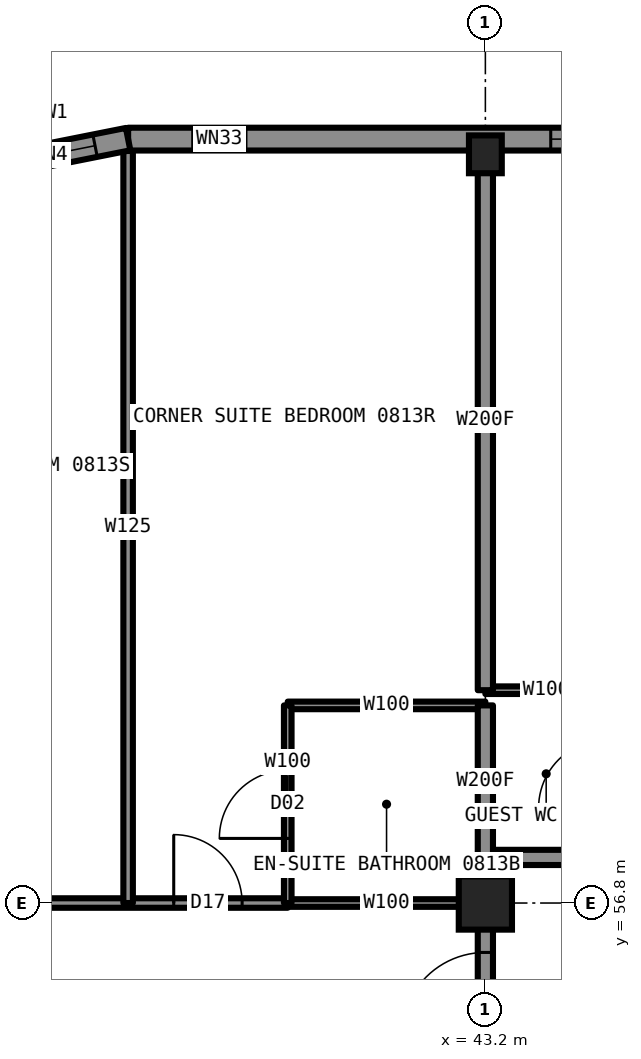
"""IFC4 building model, lengths in metres.
Left out: names, types, materials, properties, quantities, classifications, styles, units other than length and angle.
Written with IfcOpenShell. Run it as: python <this file> out.ifc"""

import sys

from ifc_helpers import new_model, si_unit, direction, frame, frame_2d, origin, origin_2d, place, context, subcontext, project, spatial, rectangle, hollow_rectangle, i_section, extrude, element, fill, save


model = new_model("IFC4")
c1 = context("Model", 3, precision=1e-05, world=origin(), true_north=direction((0.0, 1.0)))
c2 = subcontext(c1, "Body", "Model", "MODEL_VIEW")
j1 = project(units=[si_unit("LENGTHUNIT", "METRE"), si_unit("PLANEANGLEUNIT", "RADIAN")], contexts=[c1])
p1 = place(None, origin())
s1 = spatial("IfcSite", under=j1, at=p1, CompositionType="ELEMENT")
p2 = place(p1, origin())
s2 = spatial("IfcBuilding", under=s1, at=p2, CompositionType="ELEMENT")
p3 = place(p2, frame((0.0, 0.0, 28.5)))
s3 = spatial("IfcBuildingStorey", under=s2, at=p3, CompositionType="ELEMENT", Elevation=28.5)
p4 = place(p3, frame((43.2, 66.65, 0.0), z_axis=(0.0, 0.0, 1.0), x_axis=(1.0, 0.0, 0.0)))
e1 = element("IfcColumn", 1, at=p4, inside=s3, PredefinedType="COLUMN", context=c2, shape_type="SweptSolid", body=[
    extrude(i_section(OverallWidth=0.432, OverallDepth=0.498, WebThickness=0.056, FlangeThickness=0.089, at=origin_2d()), origin(), (0.0, 0.0, 1.0), 3.5),
])
p5 = place(p3, frame((43.2, 56.8, 0.0), z_axis=(0.0, 0.0, 1.0), x_axis=(1.0, 0.0, 0.0)))
e2 = element("IfcColumn", 2, at=p5, inside=s3, PredefinedType="COLUMN", context=c2, shape_type="SweptSolid", body=[
    extrude(hollow_rectangle(XDim=0.7, YDim=0.7, WallThickness=0.06, at=origin_2d()), origin(), (0.0, 0.0, 1.0), 3.5),
])
p6 = place(p3, frame((40.6, 56.8, 0.0), z_axis=(0.0, 0.0, 1.0), x_axis=(1.0, 0.0, 0.0)))
e3 = element("IfcWall", 3, at=p6, inside=s3, PredefinedType="PARTITIONING", context=c2, shape_type="SweptSolid", body=[
    extrude(rectangle(XDim=2.6, YDim=0.1, at=frame_2d((1.3, 0.0))), origin(), (0.0, 0.0, 1.0), 2.573),
])
p7 = place(p3, frame((33.3, 56.8, 0.0), z_axis=(0.0, 0.0, 1.0), x_axis=(1.0, 0.0, 0.0)))
e4 = element("IfcWall", 4, at=p7, inside=s3, PredefinedType="PARTITIONING", context=c2, shape_type="SweptSolid", body=[
    extrude(rectangle(XDim=7.3, YDim=0.125, at=frame_2d((3.65, 0.0))), origin(), (0.0, 0.0, 1.0), 2.573),
])
p8 = place(p7, frame((5.8, 0.0, 0.0)))
e5 = element("IfcOpeningElement", 5, at=p8, cuts=e4, PredefinedType="OPENING", context=c2, shape_type="SweptSolid", body=[
    extrude(rectangle(XDim=0.9, YDim=2.2, at=frame_2d((0.45, 1.1))), frame((0.0, 0.073, 0.0), z_axis=(0.0, -1.0, 0.0), x_axis=(1.0, 0.0, 0.0)), (0.0, 0.0, 1.0), 0.145),
])
p9 = place(p7, frame((2.0, 0.0, 0.0)))
e6 = element("IfcOpeningElement", 6, at=p9, cuts=e4, PredefinedType="OPENING", context=c2, shape_type="SweptSolid", body=[
    extrude(rectangle(XDim=0.9, YDim=2.2, at=frame_2d((0.45, 1.1))), frame((0.0, 0.073, 0.0), z_axis=(0.0, -1.0, 0.0), x_axis=(1.0, 0.0, 0.0)), (0.0, 0.0, 1.0), 0.145),
])
p10 = place(p3, frame((43.2, 57.4, 0.0), z_axis=(0.0, 0.0, 1.0), x_axis=(1.0, 0.0, 0.0)))
e7 = element("IfcWall", 7, at=p10, inside=s3, PredefinedType="PARTITIONING", context=c2, shape_type="SweptSolid", body=[
    extrude(rectangle(XDim=23.6, YDim=0.2, at=frame_2d((11.8, 0.0))), origin(), (0.0, 0.0, 1.0), 3.33),
])
p11 = place(p10, frame((1.85, 0.0, 0.0)))
e8 = element("IfcOpeningElement", 8, at=p11, cuts=e7, PredefinedType="OPENING", context=c2, shape_type="SweptSolid", body=[
    extrude(rectangle(XDim=1.1, YDim=2.2, at=frame_2d((0.55, 1.1))), frame((0.0, 0.11, 0.0), z_axis=(0.0, -1.0, 0.0), x_axis=(1.0, 0.0, 0.0)), (0.0, 0.0, 1.0), 0.22),
])
p12 = place(p10, frame((15.62, 0.0, 0.0)))
e9 = element("IfcOpeningElement", 9, at=p12, cuts=e7, PredefinedType="OPENING", context=c2, shape_type="SweptSolid", body=[
    extrude(rectangle(XDim=1.0, YDim=2.2, at=frame_2d((0.5, 1.1))), frame((0.0, 0.11, 0.0), z_axis=(0.0, -1.0, 0.0), x_axis=(1.0, 0.0, 0.0)), (0.0, 0.0, 1.0), 0.22),
])
p13 = place(p10, frame((20.34, 0.0, 0.0)))
e10 = element("IfcOpeningElement", 10, at=p13, cuts=e7, PredefinedType="OPENING", context=c2, shape_type="SweptSolid", body=[
    extrude(rectangle(XDim=1.0, YDim=2.2, at=frame_2d((0.5, 1.1))), frame((0.0, 0.11, 0.0), z_axis=(0.0, -1.0, 0.0), x_axis=(1.0, 0.0, 0.0)), (0.0, 0.0, 1.0), 0.22),
])
p14 = place(p3, frame((40.6, 59.4, 0.0), z_axis=(0.0, 0.0, 1.0), x_axis=(1.0, 0.0, 0.0)))
e11 = element("IfcWall", 11, at=p14, inside=s3, PredefinedType="PARTITIONING", context=c2, shape_type="SweptSolid", body=[
    extrude(rectangle(XDim=2.6, YDim=0.1, at=frame_2d((1.3, 0.0))), origin(), (0.0, 0.0, 1.0), 3.33),
])
p15 = place(p3, frame((43.2, 59.6, 0.0), z_axis=(0.0, 0.0, 1.0), x_axis=(1.0, 0.0, 0.0)))
e12 = element("IfcWall", 12, at=p15, inside=s3, PredefinedType="PARTITIONING", context=c2, shape_type="SweptSolid", body=[
    extrude(rectangle(XDim=1.6, YDim=0.1, at=frame_2d((0.8, 0.0))), origin(), (0.0, 0.0, 1.0), 3.33),
])
p16 = place(p3, frame((43.2, 33.22, 0.0), z_axis=(0.0, 0.0, 1.0), x_axis=(0.0, 1.0, 0.0)))
e13 = element("IfcWall", 13, at=p16, inside=s3, PredefinedType="PARTITIONING", context=c2, shape_type="SweptSolid", body=[
    extrude(rectangle(XDim=23.56, YDim=0.2, at=frame_2d((11.78, 0.0))), origin(), (0.0, 0.0, 1.0), 3.33),
])
p17 = place(p16, frame((6.16, 0.0, 0.0)))
e14 = element("IfcOpeningElement", 14, at=p17, cuts=e13, PredefinedType="OPENING", context=c2, shape_type="SweptSolid", body=[
    extrude(rectangle(XDim=1.0, YDim=2.2, at=frame_2d((0.5, 1.1))), frame((0.0, 0.11, 0.0), z_axis=(0.0, -1.0, 0.0), x_axis=(1.0, 0.0, 0.0)), (0.0, 0.0, 1.0), 0.22),
])
p18 = place(p16, frame((11.68, 0.0, 0.0)))
e15 = element("IfcOpeningElement", 15, at=p18, cuts=e13, PredefinedType="OPENING", context=c2, shape_type="SweptSolid", body=[
    extrude(rectangle(XDim=1.0, YDim=2.2, at=frame_2d((0.5, 1.1))), frame((0.0, 0.11, 0.0), z_axis=(0.0, -1.0, 0.0), x_axis=(1.0, 0.0, 0.0)), (0.0, 0.0, 1.0), 0.22),
])
p19 = place(p16, frame((14.54, 0.0, 0.0)))
e16 = element("IfcOpeningElement", 16, at=p19, cuts=e13, PredefinedType="OPENING", context=c2, shape_type="SweptSolid", body=[
    extrude(rectangle(XDim=1.0, YDim=2.2, at=frame_2d((0.5, 1.1))), frame((0.0, 0.11, 0.0), z_axis=(0.0, -1.0, 0.0), x_axis=(1.0, 0.0, 0.0)), (0.0, 0.0, 1.0), 0.22),
])
p20 = place(p16, frame((21.83, 0.0, 0.0)))
e17 = element("IfcOpeningElement", 17, at=p20, cuts=e13, PredefinedType="OPENING", context=c2, shape_type="SweptSolid", body=[
    extrude(rectangle(XDim=1.1, YDim=2.2, at=frame_2d((0.55, 1.1))), frame((0.0, 0.11, 0.0), z_axis=(0.0, -1.0, 0.0), x_axis=(1.0, 0.0, 0.0)), (0.0, 0.0, 1.0), 0.22),
])
p21 = place(p16, frame((0.63, 0.0, 0.0)))
e18 = element("IfcOpeningElement", 18, at=p21, cuts=e13, PredefinedType="OPENING", context=c2, shape_type="SweptSolid", body=[
    extrude(rectangle(XDim=1.1, YDim=2.2, at=frame_2d((0.55, 1.1))), frame((0.0, 0.11, 0.0), z_axis=(0.0, -1.0, 0.0), x_axis=(1.0, 0.0, 0.0)), (0.0, 0.0, 1.0), 0.22),
])
p22 = place(p3, frame((43.2, 57.4, 0.0), z_axis=(0.0, 0.0, 1.0), x_axis=(0.0, 1.0, 0.0)))
e19 = element("IfcWall", 19, at=p22, inside=s3, PredefinedType="PARTITIONING", context=c2, shape_type="SweptSolid", body=[
    extrude(rectangle(XDim=2.0, YDim=0.2, at=frame_2d((1.0, 0.0))), origin(), (0.0, 0.0, 1.0), 2.573),
])
p23 = place(p3, frame((43.2, 59.6, 0.0), z_axis=(0.0, 0.0, 1.0), x_axis=(0.0, 1.0, 0.0)))
e20 = element("IfcWall", 20, at=p23, inside=s3, PredefinedType="PARTITIONING", context=c2, shape_type="SweptSolid", body=[
    extrude(rectangle(XDim=7.1, YDim=0.2, at=frame_2d((3.55, 0.0))), origin(), (0.0, 0.0, 1.0), 2.573),
])
p24 = place(p3, frame((40.6, 56.8, 0.0), z_axis=(0.0, 0.0, 1.0), x_axis=(0.0, 1.0, 0.0)))
e21 = element("IfcWall", 21, at=p24, inside=s3, PredefinedType="PARTITIONING", context=c2, shape_type="SweptSolid", body=[
    extrude(rectangle(XDim=2.6, YDim=0.1, at=frame_2d((1.3, 0.0))), origin(), (0.0, 0.0, 1.0), 3.33),
])
p25 = place(p24, frame((0.85, 0.0, 0.0)))
e22 = element("IfcOpeningElement", 22, at=p25, cuts=e21, PredefinedType="OPENING", context=c2, shape_type="SweptSolid", body=[
    extrude(rectangle(XDim=0.9, YDim=2.1, at=frame_2d((0.45, 1.05))), frame((0.0, 0.06, 0.0), z_axis=(0.0, -1.0, 0.0), x_axis=(1.0, 0.0, 0.0)), (0.0, 0.0, 1.0), 0.12),
])
p26 = place(p3, frame((38.5, 56.8, 0.0), z_axis=(0.0, 0.0, 1.0), x_axis=(0.0, 1.0, 0.0)))
e23 = element("IfcWall", 23, at=p26, inside=s3, PredefinedType="PARTITIONING", context=c2, shape_type="SweptSolid", body=[
    extrude(rectangle(XDim=9.894, YDim=0.125, at=frame_2d((4.947, 0.0))), origin(), (0.0, 0.0, 1.0), 3.33),
])
p27 = place(p3, frame((71.5, 66.85, 0.0), z_axis=(0.0, 0.0, 1.0), x_axis=(-1.0, 0.0, 0.0)))
e24 = element("IfcWall", 24, at=p27, inside=s3, PredefinedType="SOLIDWALL", context=c2, shape_type="SweptSolid", body=[
    extrude(rectangle(XDim=33.0, YDim=0.3, at=frame_2d((16.5, 0.0))), origin(), (0.0, 0.0, 1.0), 2.83),
])
p28 = place(p27, frame((0.85, 0.0, 0.5)))
e25 = element("IfcOpeningElement", 25, at=p28, cuts=e24, PredefinedType="OPENING", context=c2, shape_type="SweptSolid", body=[
    extrude(rectangle(XDim=3.0, YDim=2.0, at=frame_2d((1.5, 1.0))), frame((0.0, 0.16, 0.0), z_axis=(0.0, -1.0, 0.0), x_axis=(1.0, 0.0, 0.0)), (0.0, 0.0, 1.0), 0.32),
])
p29 = place(p27, frame((5.56, 0.0, 0.5)))
e26 = element("IfcOpeningElement", 26, at=p29, cuts=e24, PredefinedType="OPENING", context=c2, shape_type="SweptSolid", body=[
    extrude(rectangle(XDim=3.0, YDim=2.0, at=frame_2d((1.5, 1.0))), frame((0.0, 0.16, 0.0), z_axis=(0.0, -1.0, 0.0), x_axis=(1.0, 0.0, 0.0)), (0.0, 0.0, 1.0), 0.32),
])
p30 = place(p27, frame((10.28, 0.0, 0.5)))
e27 = element("IfcOpeningElement", 27, at=p30, cuts=e24, PredefinedType="OPENING", context=c2, shape_type="SweptSolid", body=[
    extrude(rectangle(XDim=3.0, YDim=2.0, at=frame_2d((1.5, 1.0))), frame((0.0, 0.16, 0.0), z_axis=(0.0, -1.0, 0.0), x_axis=(1.0, 0.0, 0.0)), (0.0, 0.0, 1.0), 0.32),
])
p31 = place(p27, frame((15.0, 0.0, 0.5)))
e28 = element("IfcOpeningElement", 28, at=p31, cuts=e24, PredefinedType="OPENING", context=c2, shape_type="SweptSolid", body=[
    extrude(rectangle(XDim=3.0, YDim=2.0, at=frame_2d((1.5, 1.0))), frame((0.0, 0.16, 0.0), z_axis=(0.0, -1.0, 0.0), x_axis=(1.0, 0.0, 0.0)), (0.0, 0.0, 1.0), 0.32),
])
p32 = place(p27, frame((19.72, 0.0, 0.5)))
e29 = element("IfcOpeningElement", 29, at=p32, cuts=e24, PredefinedType="OPENING", context=c2, shape_type="SweptSolid", body=[
    extrude(rectangle(XDim=3.0, YDim=2.0, at=frame_2d((1.5, 1.0))), frame((0.0, 0.16, 0.0), z_axis=(0.0, -1.0, 0.0), x_axis=(1.0, 0.0, 0.0)), (0.0, 0.0, 1.0), 0.32),
])
p33 = place(p27, frame((24.44, 0.0, 0.5)))
e30 = element("IfcOpeningElement", 30, at=p33, cuts=e24, PredefinedType="OPENING", context=c2, shape_type="SweptSolid", body=[
    extrude(rectangle(XDim=3.0, YDim=2.0, at=frame_2d((1.5, 1.0))), frame((0.0, 0.16, 0.0), z_axis=(0.0, -1.0, 0.0), x_axis=(1.0, 0.0, 0.0)), (0.0, 0.0, 1.0), 0.32),
])
p34 = place(p27, frame((29.15, 0.0, 0.5)))
e31 = element("IfcOpeningElement", 31, at=p34, cuts=e24, PredefinedType="OPENING", context=c2, shape_type="SweptSolid", body=[
    extrude(rectangle(XDim=3.0, YDim=2.0, at=frame_2d((1.5, 1.0))), frame((0.0, 0.16, 0.0), z_axis=(0.0, -1.0, 0.0), x_axis=(1.0, 0.0, 0.0)), (0.0, 0.0, 1.0), 0.32),
])
p35 = place(p3, frame((38.5, 66.85, 0.0), z_axis=(0.0, 0.0, 1.0), x_axis=(-0.980787050784, -0.195081421501, 0.0)))
e32 = element("IfcWall", 32, at=p35, inside=s3, PredefinedType="SOLIDWALL", context=c2, shape_type="SweptSolid", body=[
    extrude(rectangle(XDim=2.087, YDim=0.3, at=frame_2d((1.044, 0.0))), origin(), (0.0, 0.0, 1.0), 3.33),
])
p36 = place(p35, frame((0.444, 0.0, 0.5)))
e33 = element("IfcOpeningElement", 33, at=p36, cuts=e32, PredefinedType="OPENING", context=c2, shape_type="SweptSolid", body=[
    extrude(rectangle(XDim=0.8, YDim=1.1, at=frame_2d((0.4, 0.55))), frame((0.0, 0.16, 0.0), z_axis=(0.0, -1.0, 0.0), x_axis=(1.0, 0.0, 0.0)), (0.0, 0.0, 1.0), 0.32),
])
p37 = place(p3, frame((43.2, 56.78, 0.0), z_axis=(0.0, 0.0, 1.0), x_axis=(0.0, 1.0, 0.0)))
e34 = element("IfcWall", 34, at=p37, inside=s3, PredefinedType="PARTITIONING", context=c2, shape_type="SweptSolid", body=[
    extrude(rectangle(XDim=0.62, YDim=0.2, at=frame_2d((0.31, 0.0))), origin(), (0.0, 0.0, 1.0), 2.573),
])
p38 = place(p20, origin())
e35 = element("IfcDoor", 35, at=p38, inside=s3, OperationType="SINGLE_SWING_LEFT", PredefinedType="DOOR", context=c2, shape_type="SweptSolid", body=[
    extrude(rectangle(XDim=1.1, YDim=2.2, at=frame_2d((0.55, 1.1))), frame((0.0, 0.025, 0.0), z_axis=(0.0, -1.0, 0.0), x_axis=(1.0, 0.0, 0.0)), (0.0, 0.0, 1.0), 0.05),
])
fill(e17, e35)
p39 = place(p25, origin())
e36 = element("IfcDoor", 36, at=p39, inside=s3, OperationType="SINGLE_SWING_RIGHT", PredefinedType="DOOR", context=c2, shape_type="SweptSolid", body=[
    extrude(rectangle(XDim=0.9, YDim=2.1, at=frame_2d((0.45, 1.05))), frame((0.0, 0.025, 0.0), z_axis=(0.0, -1.0, 0.0), x_axis=(1.0, 0.0, 0.0)), (0.0, 0.0, 1.0), 0.05),
])
fill(e22, e36)
p40 = place(p8, origin())
e37 = element("IfcDoor", 37, at=p40, inside=s3, OperationType="SINGLE_SWING_LEFT", PredefinedType="DOOR", context=c2, shape_type="SweptSolid", body=[
    extrude(rectangle(XDim=0.9, YDim=2.2, at=frame_2d((0.45, 1.1))), frame((0.0, 0.025, 0.0), z_axis=(0.0, -1.0, 0.0), x_axis=(1.0, 0.0, 0.0)), (0.0, 0.0, 1.0), 0.05),
])
fill(e5, e37)
p41 = place(p33, origin())
e38 = element("IfcWindow", 38, at=p41, inside=s3, PartitioningType="SINGLE_PANEL", PredefinedType="WINDOW", context=c2, shape_type="SweptSolid", body=[
    extrude(rectangle(XDim=3.0, YDim=2.0, at=frame_2d((1.5, 1.0))), frame((0.0, 0.03, 0.0), z_axis=(0.0, -1.0, 0.0), x_axis=(1.0, 0.0, 0.0)), (0.0, 0.0, 1.0), 0.06),
])
fill(e30, e38)
p42 = place(p34, origin())
e39 = element("IfcWindow", 39, at=p42, inside=s3, PartitioningType="SINGLE_PANEL", PredefinedType="WINDOW", context=c2, shape_type="SweptSolid", body=[
    extrude(rectangle(XDim=3.0, YDim=2.0, at=frame_2d((1.5, 1.0))), frame((0.0, 0.03, 0.0), z_axis=(0.0, -1.0, 0.0), x_axis=(1.0, 0.0, 0.0)), (0.0, 0.0, 1.0), 0.06),
])
fill(e31, e39)
p43 = place(p36, origin())
e40 = element("IfcWindow", 40, at=p43, inside=s3, PartitioningType="SINGLE_PANEL", PredefinedType="WINDOW", context=c2, shape_type="SweptSolid", body=[
    extrude(rectangle(XDim=0.8, YDim=1.1, at=frame_2d((0.4, 0.55))), frame((0.0, 0.03, 0.0), z_axis=(0.0, -1.0, 0.0), x_axis=(1.0, 0.0, 0.0)), (0.0, 0.0, 1.0), 0.06),
])
fill(e33, e40)
save(model, sys.argv[1])
